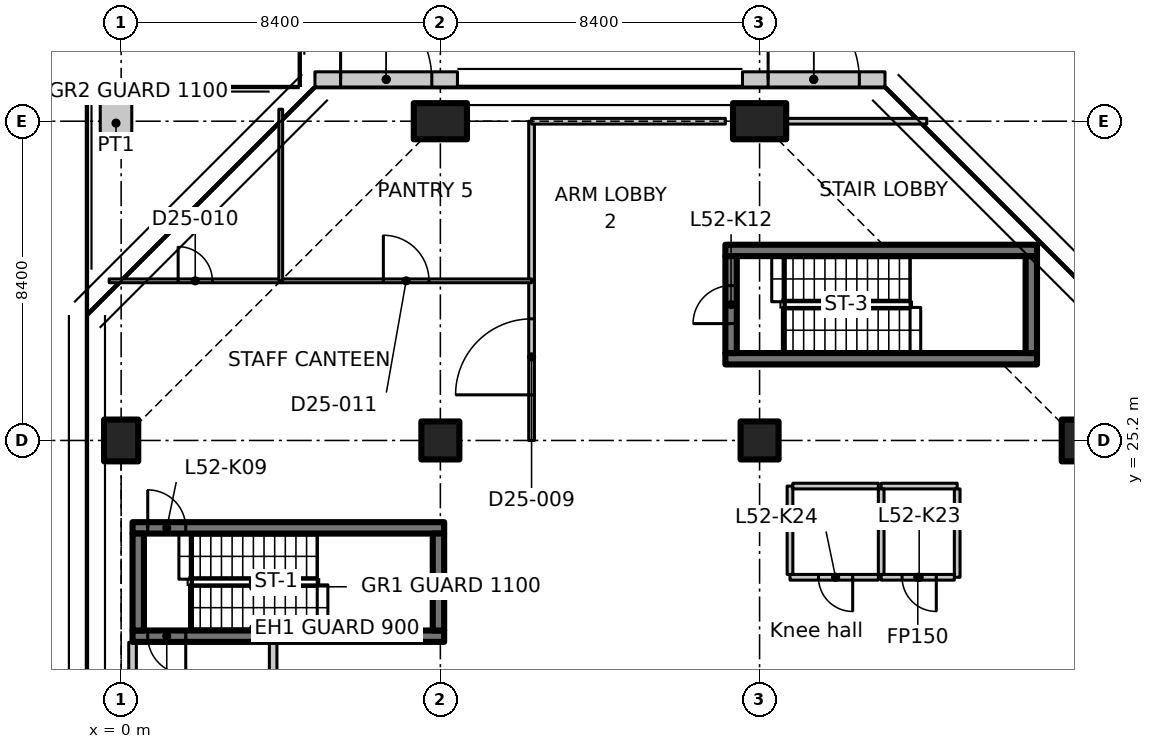
"""IFC4 building model, lengths in metres.
Left out: names, types, materials, properties, quantities, classifications, styles, units other than length and angle.
Written with IfcOpenShell. Run it as: python <this file> out.ifc"""

import sys

from ifc_helpers import new_model, si_unit, direction, frame, frame_2d, origin, origin_2d, place, context, subcontext, project, spatial, polyline, rectangle, outline, extrude, element, fill, save


model = new_model("IFC4")
c1 = context("Model", 3, precision=1e-05, world=origin(), true_north=direction((0.0, 1.0)))
c2 = subcontext(c1, "Body", "Model", "MODEL_VIEW")
j1 = project(units=[si_unit("LENGTHUNIT", "METRE"), si_unit("PLANEANGLEUNIT", "RADIAN")], contexts=[c1])
p1 = place(None, origin())
s1 = spatial("IfcSite", under=j1, at=p1, CompositionType="ELEMENT")
p2 = place(p1, origin())
s2 = spatial("IfcBuilding", under=s1, at=p2, CompositionType="ELEMENT")
p3 = place(p2, frame((0.0, 0.0, 206.4)))
s3 = spatial("IfcBuildingStorey", under=s2, at=p3, CompositionType="ELEMENT", Elevation=206.4)
p4 = place(p3, frame((0.0, 25.2, 0.0), z_axis=(0.0, 0.0, 1.0), x_axis=(1.0, 0.0, 0.0)))
e1 = element("IfcColumn", 1, at=p4, inside=s3, PredefinedType="COLUMN", context=c2, shape_type="SweptSolid", body=[
    extrude(rectangle(XDim=0.9, YDim=1.1, at=origin_2d()), origin(), (0.0, 0.0, 1.0), 4.2),
])
p5 = place(p3, frame((8.4, 25.2, 0.0), z_axis=(0.0, 0.0, 1.0), x_axis=(1.0, 0.0, 0.0)))
e2 = element("IfcColumn", 2, at=p5, inside=s3, PredefinedType="COLUMN", context=c2, shape_type="SweptSolid", body=[
    extrude(rectangle(XDim=1.0, YDim=1.0, at=origin_2d()), origin(), (0.0, 0.0, 1.0), 4.2),
])
p6 = place(p3, frame((8.4, 33.6, 0.0), z_axis=(0.0, 0.0, 1.0), x_axis=(0.0, 1.0, 0.0)))
e3 = element("IfcColumn", 3, at=p6, inside=s3, PredefinedType="COLUMN", context=c2, shape_type="SweptSolid", body=[
    extrude(rectangle(XDim=0.95, YDim=1.4, at=origin_2d()), origin(), (0.0, 0.0, 1.0), 4.2),
])
p7 = place(p3, frame((16.8, 25.2, 0.0), z_axis=(0.0, 0.0, 1.0), x_axis=(1.0, 0.0, 0.0)))
e4 = element("IfcColumn", 4, at=p7, inside=s3, PredefinedType="COLUMN", context=c2, shape_type="SweptSolid", body=[
    extrude(rectangle(XDim=1.0, YDim=1.0, at=origin_2d()), origin(), (0.0, 0.0, 1.0), 4.2),
])
p8 = place(p3, frame((16.8, 33.6, 0.0), z_axis=(0.0, 0.0, 1.0), x_axis=(0.0, 1.0, 0.0)))
e5 = element("IfcColumn", 5, at=p8, inside=s3, PredefinedType="COLUMN", context=c2, shape_type="SweptSolid", body=[
    extrude(rectangle(XDim=0.95, YDim=1.4, at=origin_2d()), origin(), (0.0, 0.0, 1.0), 4.2),
])
p9 = place(p3, frame((25.2, 25.2, 0.0), z_axis=(0.0, 0.0, 1.0), x_axis=(1.0, 0.0, 0.0)))
e6 = element("IfcColumn", 6, at=p9, inside=s3, PredefinedType="COLUMN", context=c2, shape_type="SweptSolid", body=[
    extrude(rectangle(XDim=0.9, YDim=1.1, at=origin_2d()), origin(), (0.0, 0.0, 1.0), 4.2),
])
p10 = place(p3, frame((16.35, 34.7, 0.0), z_axis=(0.0, 0.0, 1.0), x_axis=(1.0, 0.0, 0.0)))
e7 = element("IfcWall", 7, at=p10, inside=s3, PredefinedType="SOLIDWALL", context=c2, shape_type="SweptSolid", body=[
    extrude(rectangle(XDim=3.75, YDim=0.4, at=frame_2d((1.875, 0.0))), origin(), (0.0, 0.0, 1.0), 4.2),
])
p11 = place(p10, frame((0.675, 0.0, 0.0)))
e8 = element("IfcOpeningElement", 8, at=p11, cuts=e7, PredefinedType="OPENING", context=c2, shape_type="SweptSolid", body=[
    extrude(rectangle(XDim=2.4, YDim=2.7, at=frame_2d((1.2, 1.35))), frame((0.0, 0.21, 0.0), z_axis=(0.0, -1.0, 0.0), x_axis=(1.0, 0.0, 0.0)), (0.0, 0.0, 1.0), 0.42),
])
p12 = place(p3, frame((5.1, 34.7, 0.0), z_axis=(0.0, 0.0, 1.0), x_axis=(1.0, 0.0, 0.0)))
e9 = element("IfcWall", 9, at=p12, inside=s3, PredefinedType="SOLIDWALL", context=c2, shape_type="SweptSolid", body=[
    extrude(rectangle(XDim=3.75, YDim=0.4, at=frame_2d((1.875, 0.0))), origin(), (0.0, 0.0, 1.0), 4.2),
])
p13 = place(p12, frame((0.675, 0.0, 0.0)))
e10 = element("IfcOpeningElement", 10, at=p13, cuts=e9, PredefinedType="OPENING", context=c2, shape_type="SweptSolid", body=[
    extrude(rectangle(XDim=2.4, YDim=2.7, at=frame_2d((1.2, 1.35))), frame((0.0, 0.21, 0.0), z_axis=(0.0, -1.0, 0.0), x_axis=(1.0, 0.0, 0.0)), (0.0, 0.0, 1.0), 0.42),
])
p14 = place(p3, frame((0.28, 33.55, 0.0), z_axis=(0.0, 0.0, 1.0), x_axis=(-1.0, 0.0, 0.0)))
e11 = element("IfcWall", 11, at=p14, inside=s3, PredefinedType="PARAPET", context=c2, shape_type="SweptSolid", body=[
    extrude(rectangle(XDim=0.83, YDim=1.2, at=frame_2d((0.415, 0.0))), origin(), (0.0, 0.0, 1.0), 1.3),
])
p15 = place(p3, frame((8.5, 20.05, 0.0), z_axis=(0.0, 0.0, 1.0), x_axis=(-1.0, 0.0, 0.0)))
e12 = element("IfcWall", 12, at=p15, inside=s3, PredefinedType="SHEAR", context=c2, shape_type="SweptSolid", body=[
    extrude(rectangle(XDim=8.2, YDim=0.3, at=frame_2d((4.1, 0.0))), origin(), (0.0, 0.0, 1.0), 4.2),
])
p16 = place(p15, frame((6.8, 0.0, 0.0)))
e13 = element("IfcOpeningElement", 13, at=p16, cuts=e12, PredefinedType="OPENING", context=c2, shape_type="SweptSolid", body=[
    extrude(rectangle(XDim=1.0, YDim=2.1, at=frame_2d((0.5, 1.05))), frame((0.0, 0.16, 0.0), z_axis=(0.0, -1.0, 0.0), x_axis=(1.0, 0.0, 0.0)), (0.0, 0.0, 1.0), 0.32),
])
p17 = place(p3, frame((0.3, 22.9, 0.0), z_axis=(0.0, 0.0, 1.0), x_axis=(1.0, 0.0, 0.0)))
e14 = element("IfcWall", 14, at=p17, inside=s3, PredefinedType="SHEAR", context=c2, shape_type="SweptSolid", body=[
    extrude(rectangle(XDim=8.2, YDim=0.3, at=frame_2d((4.1, 0.0))), origin(), (0.0, 0.0, 1.0), 4.2),
])
p18 = place(p17, frame((0.4, 0.0, 0.0)))
e15 = element("IfcOpeningElement", 15, at=p18, cuts=e14, PredefinedType="OPENING", context=c2, shape_type="SweptSolid", body=[
    extrude(rectangle(XDim=1.0, YDim=2.1, at=frame_2d((0.5, 1.05))), frame((0.0, 0.16, 0.0), z_axis=(0.0, -1.0, 0.0), x_axis=(1.0, 0.0, 0.0)), (0.0, 0.0, 1.0), 0.32),
])
for number, where, z_axis, x_axis in (
    (16, (0.45, 20.2, 0.0), (0.0, 0.0, 1.0), (0.0, 1.0, 0.0)),
    (17, (8.35, 20.2, 0.0), (0.0, 0.0, 1.0), (0.0, 1.0, 0.0)),
):
    element("IfcWall", number, at=place(p3, frame(where, z_axis=z_axis, x_axis=x_axis)), inside=s3, PredefinedType="SHEAR", context=c2, shape_type="SweptSolid", body=[
        extrude(rectangle(XDim=2.55, YDim=0.3, at=frame_2d((1.275, 0.0))), origin(), (0.0, 0.0, 1.0), 4.2),
    ])
for number, where, z_axis, x_axis in (
    (18, (15.9, 27.35, 0.0), (0.0, 0.0, 1.0), (1.0, 0.0, 0.0)),
    (19, (15.9, 30.2, 0.0), (0.0, 0.0, 1.0), (1.0, 0.0, 0.0)),
):
    element("IfcWall", number, at=place(p3, frame(where, z_axis=z_axis, x_axis=x_axis)), inside=s3, PredefinedType="SHEAR", context=c2, shape_type="SweptSolid", body=[
        extrude(rectangle(XDim=8.2, YDim=0.3, at=frame_2d((4.1, 0.0))), origin(), (0.0, 0.0, 1.0), 4.2),
    ])
p19 = place(p3, frame((16.05, 27.5, 0.0), z_axis=(0.0, 0.0, 1.0), x_axis=(0.0, 1.0, 0.0)))
e20 = element("IfcWall", 20, at=p19, inside=s3, PredefinedType="SHEAR", context=c2, shape_type="SweptSolid", body=[
    extrude(rectangle(XDim=2.55, YDim=0.3, at=frame_2d((1.275, 0.0))), origin(), (0.0, 0.0, 1.0), 4.2),
])
p20 = place(p19, frame((0.775, 0.0, 0.0)))
e21 = element("IfcOpeningElement", 21, at=p20, cuts=e20, PredefinedType="OPENING", context=c2, shape_type="SweptSolid", body=[
    extrude(rectangle(XDim=1.0, YDim=2.1, at=frame_2d((0.5, 1.05))), frame((0.0, 0.16, 0.0), z_axis=(0.0, -1.0, 0.0), x_axis=(1.0, 0.0, 0.0)), (0.0, 0.0, 1.0), 0.32),
])
p21 = place(p3, frame((23.95, 27.5, 0.0), z_axis=(0.0, 0.0, 1.0), x_axis=(0.0, 1.0, 0.0)))
e22 = element("IfcWall", 22, at=p21, inside=s3, PredefinedType="SHEAR", context=c2, shape_type="SweptSolid", body=[
    extrude(rectangle(XDim=2.55, YDim=0.3, at=frame_2d((1.275, 0.0))), origin(), (0.0, 0.0, 1.0), 4.2),
])
p22 = place(p3, frame((0.3, 16.812, 0.0), z_axis=(0.0, 0.0, 1.0), x_axis=(0.0, 1.0, 0.0)))
e23 = element("IfcWall", 23, at=p22, inside=s3, PredefinedType="PARTITIONING", context=c2, shape_type="SweptSolid", body=[
    extrude(rectangle(XDim=3.076, YDim=0.2, at=frame_2d((1.538, 0.0))), origin(), (0.0, 0.0, 1.0), 3.83),
])
p23 = place(p3, frame((4.0, 19.888, 0.0), z_axis=(0.0, 0.0, 1.0), x_axis=(0.0, -1.0, 0.0)))
e24 = element("IfcWall", 24, at=p23, inside=s3, PredefinedType="PARTITIONING", context=c2, shape_type="SweptSolid", body=[
    extrude(rectangle(XDim=3.076, YDim=0.2, at=frame_2d((1.538, 0.0))), origin(), (0.0, 0.0, 1.0), 4.2),
])
p24 = place(p23, frame((1.488, 0.0, 0.0)))
e25 = element("IfcOpeningElement", 25, at=p24, cuts=e24, PredefinedType="OPENING", context=c2, shape_type="SweptSolid", body=[
    extrude(rectangle(XDim=1.0, YDim=2.1, at=frame_2d((0.5, 1.05))), frame((0.0, 0.11, 0.0), z_axis=(0.0, -1.0, 0.0), x_axis=(1.0, 0.0, 0.0)), (0.0, 0.0, 1.0), 0.22),
])
p25 = place(p3, frame((20.0, 24.0, 0.0), z_axis=(0.0, 0.0, 1.0), x_axis=(1.0, 0.0, 0.0)))
e26 = element("IfcWall", 26, at=p25, inside=s3, PredefinedType="PARTITIONING", context=c2, shape_type="SweptSolid", body=[
    extrude(rectangle(XDim=2.0, YDim=0.15, at=frame_2d((1.0, 0.0))), origin(), (0.0, 0.0, 1.0), 4.2),
])
p26 = place(p3, frame((22.0, 23.925, 0.0), z_axis=(0.0, 0.0, 1.0), x_axis=(0.0, -1.0, 0.0)))
e27 = element("IfcWall", 27, at=p26, inside=s3, PredefinedType="PARTITIONING", context=c2, shape_type="SweptSolid", body=[
    extrude(rectangle(XDim=2.325, YDim=0.15, at=frame_2d((1.163, 0.0))), origin(), (0.0, 0.0, 1.0), 4.2),
])
p27 = place(p3, frame((21.925, 21.6, 0.0), z_axis=(0.0, 0.0, 1.0), x_axis=(-1.0, 0.0, 0.0)))
e28 = element("IfcWall", 28, at=p27, inside=s3, PredefinedType="PARTITIONING", context=c2, shape_type="SweptSolid", body=[
    extrude(rectangle(XDim=1.925, YDim=0.15, at=frame_2d((0.962, 0.0))), origin(), (0.0, 0.0, 1.0), 4.2),
])
p28 = place(p27, frame((0.475, 0.0, 0.0)))
e29 = element("IfcOpeningElement", 29, at=p28, cuts=e28, PredefinedType="OPENING", context=c2, shape_type="SweptSolid", body=[
    extrude(rectangle(XDim=0.9, YDim=2.1, at=frame_2d((0.45, 1.05))), frame((0.0, 0.085, 0.0), z_axis=(0.0, -1.0, 0.0), x_axis=(1.0, 0.0, 0.0)), (0.0, 0.0, 1.0), 0.17),
])
p29 = place(p3, frame((20.0, 21.675, 0.0), z_axis=(0.0, 0.0, 1.0), x_axis=(0.0, 1.0, 0.0)))
e30 = element("IfcWall", 30, at=p29, inside=s3, PredefinedType="PARTITIONING", context=c2, shape_type="SweptSolid", body=[
    extrude(rectangle(XDim=2.25, YDim=0.15, at=frame_2d((1.125, 0.0))), origin(), (0.0, 0.0, 1.0), 4.2),
])
p30 = place(p3, frame((19.925, 21.6, 0.0), z_axis=(0.0, 0.0, 1.0), x_axis=(-1.0, 0.0, 0.0)))
e31 = element("IfcWall", 31, at=p30, inside=s3, PredefinedType="PARTITIONING", context=c2, shape_type="SweptSolid", body=[
    extrude(rectangle(XDim=2.325, YDim=0.15, at=frame_2d((1.163, 0.0))), origin(), (0.0, 0.0, 1.0), 4.2),
])
p31 = place(p30, frame((0.675, 0.0, 0.0)))
e32 = element("IfcOpeningElement", 32, at=p31, cuts=e31, PredefinedType="OPENING", context=c2, shape_type="SweptSolid", body=[
    extrude(rectangle(XDim=0.9, YDim=2.1, at=frame_2d((0.45, 1.05))), frame((0.0, 0.085, 0.0), z_axis=(0.0, -1.0, 0.0), x_axis=(1.0, 0.0, 0.0)), (0.0, 0.0, 1.0), 0.17),
])
p32 = place(p3, frame((17.6, 21.675, 0.0), z_axis=(0.0, 0.0, 1.0), x_axis=(0.0, 1.0, 0.0)))
e33 = element("IfcWall", 33, at=p32, inside=s3, PredefinedType="PARTITIONING", context=c2, shape_type="SweptSolid", body=[
    extrude(rectangle(XDim=2.325, YDim=0.15, at=frame_2d((1.163, 0.0))), origin(), (0.0, 0.0, 1.0), 4.2),
])
p33 = place(p3, frame((17.675, 24.0, 0.0), z_axis=(0.0, 0.0, 1.0), x_axis=(1.0, 0.0, 0.0)))
e34 = element("IfcWall", 34, at=p33, inside=s3, PredefinedType="PARTITIONING", context=c2, shape_type="SweptSolid", body=[
    extrude(rectangle(XDim=2.25, YDim=0.15, at=frame_2d((1.125, 0.0))), origin(), (0.0, 0.0, 1.0), 4.2),
])
p34 = place(p3, frame((10.8, 25.2, 0.0), z_axis=(0.0, 0.0, 1.0), x_axis=(0.0, 1.0, 0.0)))
e35 = element("IfcWall", 35, at=p34, inside=s3, PredefinedType="PARTITIONING", context=c2, shape_type="SweptSolid", body=[
    extrude(rectangle(XDim=4.2, YDim=0.15, at=frame_2d((2.1, 0.0))), origin(), (0.0, 0.0, 1.0), 4.18),
])
p35 = place(p34, frame((1.2, 0.0, 0.0)))
e36 = element("IfcOpeningElement", 36, at=p35, cuts=e35, PredefinedType="OPENING", context=c2, shape_type="SweptSolid", body=[
    extrude(rectangle(XDim=2.0, YDim=2.4, at=frame_2d((1.0, 1.2))), frame((0.0, 0.085, 0.0), z_axis=(0.0, -1.0, 0.0), x_axis=(1.0, 0.0, 0.0)), (0.0, 0.0, 1.0), 0.17),
])
p36 = place(p3, frame((10.8, 29.4, 0.0), z_axis=(0.0, 0.0, 1.0), x_axis=(0.0, 1.0, 0.0)))
e37 = element("IfcWall", 37, at=p36, inside=s3, PredefinedType="PARTITIONING", context=c2, shape_type="SweptSolid", body=[
    extrude(rectangle(XDim=4.2, YDim=0.15, at=frame_2d((2.1, 0.0))), origin(), (0.0, 0.0, 1.0), 3.83),
])
p37 = place(p3, frame((10.8, 33.6, 0.0), z_axis=(0.0, 0.0, 1.0), x_axis=(1.0, 0.0, 0.0)))
e38 = element("IfcWall", 38, at=p37, inside=s3, PredefinedType="PARTITIONING", context=c2, shape_type="SweptSolid", body=[
    extrude(outline(polyline([(0.0, 0.0), (5.1, 0.0), (5.1, 3.83), (0.0, 3.83), (0.0, 0.0)])), frame((0.0, 0.075, 0.0), z_axis=(0.0, -1.0, 0.0), x_axis=(1.0, 0.0, 0.0)), (0.0, 0.0, 1.0), 0.15),
])
p38 = place(p3, frame((17.52, 33.6, 0.0), z_axis=(0.0, 0.0, 1.0), x_axis=(1.0, 0.0, 0.0)))
e39 = element("IfcWall", 39, at=p38, inside=s3, PredefinedType="PARTITIONING", context=c2, shape_type="SweptSolid", body=[
    extrude(rectangle(XDim=3.68, YDim=0.15, at=frame_2d((1.84, 0.0))), origin(), (0.0, 0.0, 1.0), 4.18),
])
p39 = place(p3, frame((-0.315, 29.4, 0.0), z_axis=(0.0, 0.0, 1.0), x_axis=(1.0, 0.0, 0.0)))
e40 = element("IfcWall", 40, at=p39, inside=s3, PredefinedType="PARTITIONING", context=c2, shape_type="SweptSolid", body=[
    extrude(rectangle(XDim=4.515, YDim=0.1, at=frame_2d((2.258, 0.0))), origin(), (0.0, 0.0, 1.0), 3.83),
])
p40 = place(p39, frame((1.815, 0.0, 0.0)))
e41 = element("IfcOpeningElement", 41, at=p40, cuts=e40, PredefinedType="OPENING", context=c2, shape_type="SweptSolid", body=[
    extrude(rectangle(XDim=0.9, YDim=2.1, at=frame_2d((0.45, 1.05))), frame((0.0, 0.06, 0.0), z_axis=(0.0, -1.0, 0.0), x_axis=(1.0, 0.0, 0.0)), (0.0, 0.0, 1.0), 0.12),
])
p41 = place(p3, frame((4.2, 29.4, 0.0), z_axis=(0.0, 0.0, 1.0), x_axis=(1.0, 0.0, 0.0)))
e42 = element("IfcWall", 42, at=p41, inside=s3, PredefinedType="PARTITIONING", context=c2, shape_type="SweptSolid", body=[
    extrude(outline(polyline([(0.0, 0.0), (6.6, 0.0), (6.6, 4.18), (0.666, 4.18), (0.664, 3.83), (0.0, 3.83), (0.0, 0.0)])), frame((0.0, 0.05, 0.0), z_axis=(0.0, -1.0, 0.0), x_axis=(1.0, 0.0, 0.0)), (0.0, 0.0, 1.0), 0.1),
])
p42 = place(p41, frame((2.7, 0.0, 0.0)))
e43 = element("IfcOpeningElement", 43, at=p42, cuts=e42, PredefinedType="OPENING", context=c2, shape_type="SweptSolid", body=[
    extrude(rectangle(XDim=1.2, YDim=2.1, at=frame_2d((0.6, 1.05))), frame((0.0, 0.06, 0.0), z_axis=(0.0, -1.0, 0.0), x_axis=(1.0, 0.0, 0.0)), (0.0, 0.0, 1.0), 0.12),
])
p43 = place(p3, frame((4.2, 33.915, 0.0), z_axis=(0.0, 0.0, 1.0), x_axis=(0.0, -1.0, 0.0)))
e44 = element("IfcWall", 44, at=p43, inside=s3, PredefinedType="PARTITIONING", context=c2, shape_type="SweptSolid", body=[
    extrude(rectangle(XDim=4.515, YDim=0.1, at=frame_2d((2.258, 0.0))), origin(), (0.0, 0.0, 1.0), 3.83),
])
p44 = place(p11, origin())
e45 = element("IfcDoor", 45, at=p44, inside=s3, OperationType="DOUBLE_DOOR_SINGLE_SWING", PredefinedType="DOOR", context=c2, shape_type="SweptSolid", body=[
    extrude(rectangle(XDim=2.4, YDim=2.7, at=frame_2d((1.2, 1.35))), frame((0.0, 0.025, 0.0), z_axis=(0.0, -1.0, 0.0), x_axis=(1.0, 0.0, 0.0)), (0.0, 0.0, 1.0), 0.05),
])
fill(e8, e45)
p45 = place(p13, origin())
e46 = element("IfcDoor", 46, at=p45, inside=s3, OperationType="DOUBLE_DOOR_SINGLE_SWING", PredefinedType="DOOR", context=c2, shape_type="SweptSolid", body=[
    extrude(rectangle(XDim=2.4, YDim=2.7, at=frame_2d((1.2, 1.35))), frame((0.0, 0.025, 0.0), z_axis=(0.0, -1.0, 0.0), x_axis=(1.0, 0.0, 0.0)), (0.0, 0.0, 1.0), 0.05),
])
fill(e10, e46)
p46 = place(p16, origin())
e47 = element("IfcDoor", 47, at=p46, inside=s3, OperationType="SINGLE_SWING_LEFT", PredefinedType="DOOR", context=c2, shape_type="SweptSolid", body=[
    extrude(rectangle(XDim=1.0, YDim=2.1, at=frame_2d((0.5, 1.05))), frame((0.0, 0.025, 0.0), z_axis=(0.0, -1.0, 0.0), x_axis=(1.0, 0.0, 0.0)), (0.0, 0.0, 1.0), 0.05),
])
fill(e13, e47)
p47 = place(p18, origin())
e48 = element("IfcDoor", 48, at=p47, inside=s3, OperationType="SINGLE_SWING_RIGHT", PredefinedType="DOOR", context=c2, shape_type="SweptSolid", body=[
    extrude(rectangle(XDim=1.0, YDim=2.1, at=frame_2d((0.5, 1.05))), frame((0.0, 0.025, 0.0), z_axis=(0.0, -1.0, 0.0), x_axis=(1.0, 0.0, 0.0)), (0.0, 0.0, 1.0), 0.05),
])
fill(e15, e48)
p48 = place(p20, origin())
e49 = element("IfcDoor", 49, at=p48, inside=s3, OperationType="SINGLE_SWING_LEFT", PredefinedType="DOOR", context=c2, shape_type="SweptSolid", body=[
    extrude(rectangle(XDim=1.0, YDim=2.1, at=frame_2d((0.5, 1.05))), frame((0.0, 0.025, 0.0), z_axis=(0.0, -1.0, 0.0), x_axis=(1.0, 0.0, 0.0)), (0.0, 0.0, 1.0), 0.05),
])
fill(e21, e49)
p49 = place(p28, origin())
e50 = element("IfcDoor", 50, at=p49, inside=s3, OperationType="SINGLE_SWING_RIGHT", PredefinedType="DOOR", context=c2, shape_type="SweptSolid", body=[
    extrude(rectangle(XDim=0.9, YDim=2.1, at=frame_2d((0.45, 1.05))), frame((0.0, 0.025, 0.0), z_axis=(0.0, -1.0, 0.0), x_axis=(1.0, 0.0, 0.0)), (0.0, 0.0, 1.0), 0.05),
])
fill(e29, e50)
p50 = place(p31, origin())
e51 = element("IfcDoor", 51, at=p50, inside=s3, OperationType="SINGLE_SWING_LEFT", PredefinedType="DOOR", context=c2, shape_type="SweptSolid", body=[
    extrude(rectangle(XDim=0.9, YDim=2.1, at=frame_2d((0.45, 1.05))), frame((0.0, 0.025, 0.0), z_axis=(0.0, -1.0, 0.0), x_axis=(1.0, 0.0, 0.0)), (0.0, 0.0, 1.0), 0.05),
])
fill(e32, e51)
p51 = place(p35, origin())
e52 = element("IfcDoor", 52, at=p51, inside=s3, OperationType="DOUBLE_DOOR_SINGLE_SWING", PredefinedType="DOOR", context=c2, shape_type="SweptSolid", body=[
    extrude(rectangle(XDim=2.0, YDim=2.4, at=frame_2d((1.0, 1.2))), frame((0.0, 0.025, 0.0), z_axis=(0.0, -1.0, 0.0), x_axis=(1.0, 0.0, 0.0)), (0.0, 0.0, 1.0), 0.05),
])
fill(e36, e52)
p52 = place(p40, origin())
e53 = element("IfcDoor", 53, at=p52, inside=s3, OperationType="SINGLE_SWING_LEFT", PredefinedType="DOOR", context=c2, shape_type="SweptSolid", body=[
    extrude(rectangle(XDim=0.9, YDim=2.1, at=frame_2d((0.45, 1.05))), frame((0.0, 0.025, 0.0), z_axis=(0.0, -1.0, 0.0), x_axis=(1.0, 0.0, 0.0)), (0.0, 0.0, 1.0), 0.05),
])
fill(e41, e53)
p53 = place(p42, origin())
e54 = element("IfcDoor", 54, at=p53, inside=s3, OperationType="SINGLE_SWING_LEFT", PredefinedType="DOOR", context=c2, shape_type="SweptSolid", body=[
    extrude(rectangle(XDim=1.2, YDim=2.1, at=frame_2d((0.6, 1.05))), frame((0.0, 0.025, 0.0), z_axis=(0.0, -1.0, 0.0), x_axis=(1.0, 0.0, 0.0)), (0.0, 0.0, 1.0), 0.05),
])
fill(e43, e54)
save(model, sys.argv[1])
